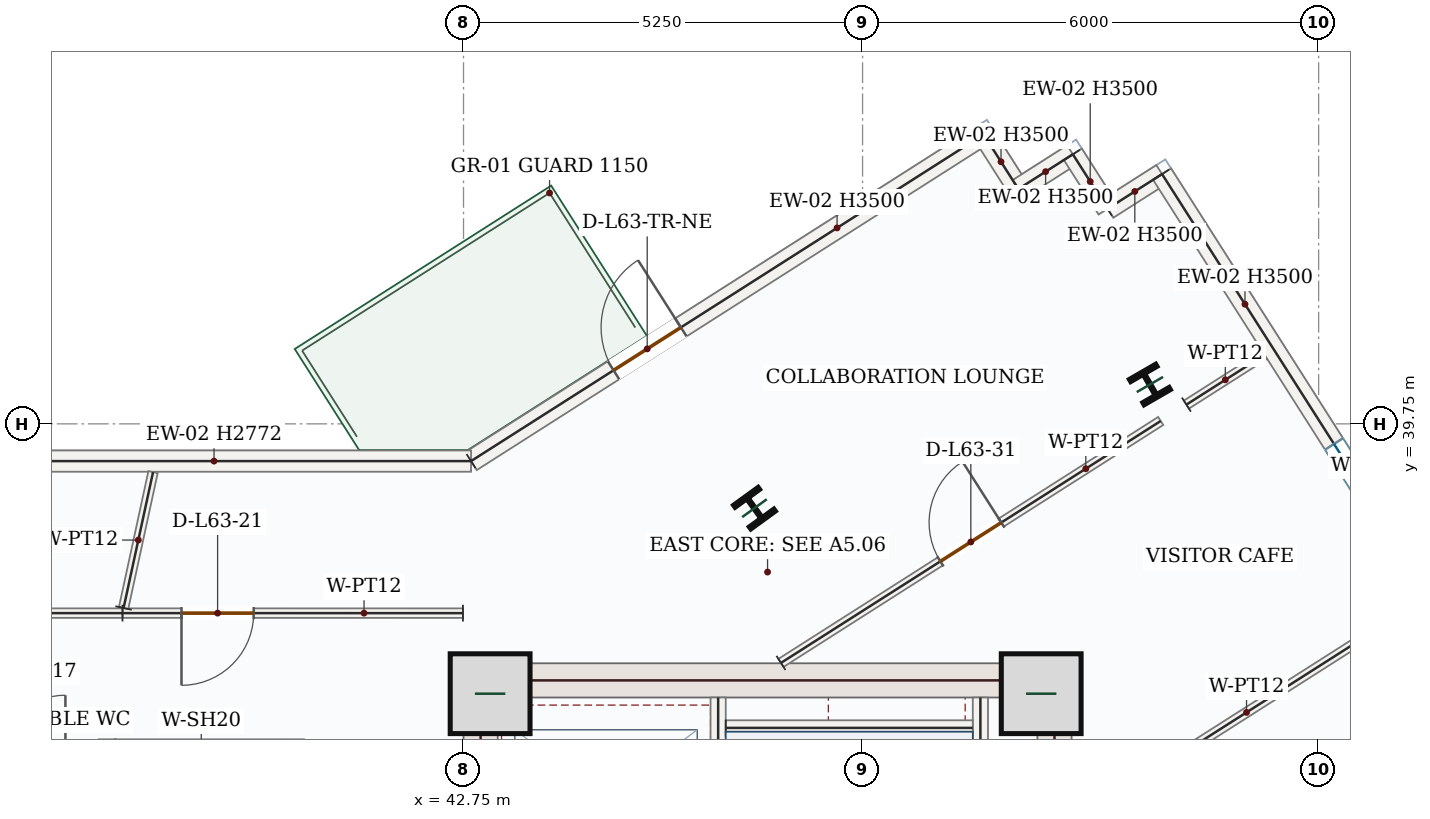
"""IFC4 building model, lengths in metres.
Left out: names, types, materials, properties, quantities, classifications, styles, units other than length and angle.
Written with IfcOpenShell. Run it as: python <this file> out.ifc"""

import sys

from ifc_helpers import new_model, si_unit, direction, frame, frame_2d, origin, origin_2d, place, context, subcontext, project, spatial, rectangle, i_section, extrude, source, transform, mapped, element, fill, save


model = new_model("IFC4")
c1 = context("Model", 3, precision=1e-05, world=origin(), true_north=direction((0.0, 1.0)))
c2 = subcontext(c1, "Body", "Model", "MODEL_VIEW")
j1 = project(units=[si_unit("LENGTHUNIT", "METRE"), si_unit("PLANEANGLEUNIT", "RADIAN")], contexts=[c1])
p1 = place(None, origin())
s1 = spatial("IfcSite", under=j1, at=p1, CompositionType="ELEMENT")
p2 = place(p1, origin())
s2 = spatial("IfcBuilding", under=s1, at=p2, CompositionType="ELEMENT")
p3 = place(p2, frame((0.0, 0.0, 265.35)))
s3 = spatial("IfcBuildingStorey", under=s2, at=p3, CompositionType="ELEMENT", Elevation=265.35)
p4 = place(p3, frame((42.975, 28.05, 0.0), z_axis=(0.0, 0.0, 1.0), x_axis=(0.0, 1.0, 0.0)))
e1 = element("IfcWall", 1, at=p4, inside=s3, PredefinedType="SHEAR", context=c2, shape_type="SweptSolid", body=[
    extrude(rectangle(XDim=8.55, YDim=0.45, at=frame_2d((4.275, 0.0))), origin(), (0.0, 0.0, 1.0), 3.5),
])
p5 = place(p4, frame((1.5, 0.0, 0.0)))
e2 = element("IfcOpeningElement", 2, at=p5, cuts=e1, PredefinedType="OPENING", context=c2, shape_type="SweptSolid", body=[
    extrude(rectangle(XDim=1.1, YDim=2.2, at=frame_2d((0.55, 1.1))), frame((0.0, 0.235, 0.0), z_axis=(0.0, -1.0, 0.0), x_axis=(1.0, 0.0, 0.0)), (0.0, 0.0, 1.0), 0.47),
])
m1 = source(origin(), c2, "Body", "SweptSolid", [
    extrude(rectangle(XDim=8.55, YDim=0.45, at=frame_2d((4.275, 0.0))), origin(), (0.0, 0.0, 1.0), 3.5),
])
p6 = place(p3, frame((50.525, 28.05, 0.0), z_axis=(0.0, 0.0, 1.0), x_axis=(0.0, 1.0, 0.0)))
e3 = element("IfcWall", 3, at=p6, inside=s3, PredefinedType="SHEAR", context=c2, shape_type="MappedRepresentation", body=[
    mapped(m1, transform((0.0, 0.0, 0.0), x_axis=(1.0, 0.0, 0.0), y_axis=(0.0, 1.0, 0.0), z_axis=(0.0, 0.0, 1.0), scale=1.0)),
])
m2 = source(origin(), c2, "Body", "SweptSolid", [
    extrude(rectangle(XDim=7.1, YDim=0.45, at=frame_2d((3.55, 0.0))), origin(), (0.0, 0.0, 1.0), 3.5),
])
p7 = place(p3, frame((43.2, 36.375, 0.0), z_axis=(0.0, 0.0, 1.0), x_axis=(1.0, 0.0, 0.0)))
e4 = element("IfcWall", 4, at=p7, inside=s3, PredefinedType="SHEAR", context=c2, shape_type="MappedRepresentation", body=[
    mapped(m2, transform((0.0, 0.0, 0.0), x_axis=(1.0, 0.0, 0.0), y_axis=(0.0, 1.0, 0.0), z_axis=(0.0, 0.0, 1.0), scale=1.0)),
])
m3 = source(origin(), c2, "Body", "SweptSolid", [
    extrude(rectangle(XDim=1.05, YDim=1.05, at=origin_2d()), origin(), (0.0, 0.0, 1.0), 3.75),
])
for number, where, z_axis, x_axis in (
    (5, (43.1, 36.2, 0.0), (0.0, 0.0, 1.0), (1.0, 0.0, 0.0)),
    (6, (50.35, 36.2, 0.0), (0.0, 0.0, 1.0), (1.0, 0.0, 0.0)),
):
    element("IfcColumn", number, at=place(p3, frame(where, z_axis=z_axis, x_axis=x_axis)), inside=s3, PredefinedType="COLUMN", context=c2, shape_type="MappedRepresentation", body=[
        mapped(m3, transform((0.0, 0.0, 0.0), x_axis=(1.0, 0.0, 0.0), y_axis=(0.0, 1.0, 0.0), z_axis=(0.0, 0.0, 1.0), scale=1.0)),
    ])
m4 = source(origin(), c2, "Body", "SweptSolid", [
    extrude(i_section(OverallWidth=0.399, OverallDepth=0.386, WebThickness=0.021, FlangeThickness=0.033, FilletRadius=0.018, at=origin_2d()), origin(), (0.0, 0.0, 1.0), 3.75),
])
for number, where, z_axis, x_axis in (
    (7, (46.578, 38.641, 0.0), (0.0, 0.0, 1.0), (0.809, 0.588, 0.0)),
    (8, (51.78, 40.268, 0.0), (0.0, 0.0, 1.0), (0.866, 0.5, 0.0)),
):
    element("IfcColumn", number, at=place(p3, frame(where, z_axis=z_axis, x_axis=x_axis)), inside=s3, PredefinedType="COLUMN", context=c2, shape_type="MappedRepresentation", body=[
        mapped(m4, transform((0.0, 0.0, 0.0), x_axis=(1.0, 0.0, 0.0), y_axis=(0.0, 1.0, 0.0), z_axis=(0.0, 0.0, 1.0), scale=1.0)),
    ])
p8 = place(p3, frame((42.849, 39.26, 0.0), z_axis=(0.0, 0.0, 1.0), x_axis=(0.843388565396, 0.537304129669, 0.0)))
e9 = element("IfcWall", 9, at=p8, inside=s3, PredefinedType="SOLIDWALL", context=c2, shape_type="SweptSolid", body=[
    extrude(rectangle(XDim=7.996, YDim=0.28, at=frame_2d((3.998, 0.0))), origin(), (0.0, 0.0, 1.0), 3.5),
])
p9 = place(p8, frame((2.223, 0.0, 0.0)))
e10 = element("IfcOpeningElement", 10, at=p9, cuts=e9, PredefinedType="OPENING", context=c2, shape_type="SweptSolid", body=[
    extrude(rectangle(XDim=1.05, YDim=2.15, at=frame_2d((0.525, 1.075))), frame((0.0, 0.15, 0.0), z_axis=(0.0, -1.0, 0.0), x_axis=(1.0, 0.0, 0.0)), (0.0, 0.0, 1.0), 0.3),
])
m5 = source(origin(), c2, "Body", "SweptSolid", [
    extrude(rectangle(XDim=0.85, YDim=0.28, at=frame_2d((0.425, 0.0))), origin(), (0.0, 0.0, 1.0), 3.5),
])
for number, where, z_axis, x_axis in (
    (11, (49.593, 43.556, 0.0), (0.0, 0.0, 1.0), (0.537, -0.843, 0.0)),
    (12, (50.05, 42.84, 0.0), (0.0, 0.0, 1.0), (0.843, 0.537, 0.0)),
    (13, (50.767, 43.296, 0.0), (0.0, 0.0, 1.0), (0.537, -0.843, 0.0)),
    (14, (51.223, 42.579, 0.0), (0.0, 0.0, 1.0), (0.843, 0.537, 0.0)),
):
    element("IfcWall", number, at=place(p3, frame(where, z_axis=z_axis, x_axis=x_axis)), inside=s3, PredefinedType="SOLIDWALL", context=c2, shape_type="MappedRepresentation", body=[
        mapped(m5, transform((0.0, 0.0, 0.0), x_axis=(1.0, 0.0, 0.0), y_axis=(0.0, 1.0, 0.0), z_axis=(0.0, 0.0, 1.0), scale=1.0)),
    ])
p10 = place(p3, frame((51.94, 43.036, 0.0), z_axis=(0.0, 0.0, 1.0), x_axis=(0.537314949054, -0.843381672508, 0.0)))
e15 = element("IfcWall", 15, at=p10, inside=s3, PredefinedType="SOLIDWALL", context=c2, shape_type="SweptSolid", body=[
    extrude(rectangle(XDim=9.92, YDim=0.28, at=frame_2d((4.96, 0.0))), origin(), (0.0, 0.0, 1.0), 3.5),
])
p11 = place(p10, frame((4.21, 0.0, 0.85)))
e16 = element("IfcOpeningElement", 16, at=p11, cuts=e15, PredefinedType="OPENING", context=c2, shape_type="SweptSolid", body=[
    extrude(rectangle(XDim=1.5, YDim=1.5, at=frame_2d((0.75, 0.75))), frame((0.0, 0.15, 0.0), z_axis=(0.0, -1.0, 0.0), x_axis=(1.0, 0.0, 0.0)), (0.0, 0.0, 1.0), 0.3),
])
m6 = source(origin(), c2, "Body", "SweptSolid", [
    extrude(rectangle(XDim=6.763, YDim=0.28, at=frame_2d((3.381, 0.0))), origin(), (0.0, 0.0, 1.0), 2.772),
])
p12 = place(p3, frame((36.086, 39.26, 0.0), z_axis=(0.0, 0.0, 1.0), x_axis=(1.0, 0.0, 0.0)))
e17 = element("IfcWall", 17, at=p12, inside=s3, PredefinedType="SOLIDWALL", context=c2, shape_type="MappedRepresentation", body=[
    mapped(m6, transform((0.0, 0.0, 0.0), x_axis=(1.0, 0.0, 0.0), y_axis=(0.0, 1.0, 0.0), z_axis=(0.0, 0.0, 1.0), scale=1.0)),
])
m7 = source(origin(), c2, "Body", "SweptSolid", [
    extrude(rectangle(XDim=7.87, YDim=0.2, at=frame_2d((3.935, 0.0))), origin(), (0.0, 0.0, 1.0), 3.5),
])
p13 = place(p3, frame((49.55, 28.28, 0.0), z_axis=(0.0, 0.0, 1.0), x_axis=(0.0, 1.0, 0.0)))
e18 = element("IfcWall", 18, at=p13, inside=s3, PredefinedType="SOLIDWALL", context=c2, shape_type="MappedRepresentation", body=[
    mapped(m7, transform((0.0, 0.0, 0.0), x_axis=(1.0, 0.0, 0.0), y_axis=(0.0, 1.0, 0.0), z_axis=(0.0, 0.0, 1.0), scale=1.0)),
])
p14 = place(p3, frame((46.1, 28.15, 0.0), z_axis=(0.0, 0.0, 1.0), x_axis=(0.0, 1.0, 0.0)))
e19 = element("IfcWall", 19, at=p14, inside=s3, PredefinedType="SOLIDWALL", context=c2, shape_type="SweptSolid", body=[
    extrude(rectangle(XDim=8.0, YDim=0.2, at=frame_2d((4.0, 0.0))), origin(), (0.0, 0.0, 1.0), 3.5),
])
p15 = place(p14, frame((0.4, 0.0, 0.0)))
e20 = element("IfcOpeningElement", 20, at=p15, cuts=e19, PredefinedType="OPENING", context=c2, shape_type="SweptSolid", body=[
    extrude(rectangle(XDim=1.05, YDim=2.15, at=frame_2d((0.525, 1.075))), frame((0.0, 0.11, 0.0), z_axis=(0.0, -1.0, 0.0), x_axis=(1.0, 0.0, 0.0)), (0.0, 0.0, 1.0), 0.22),
])
m8 = source(origin(), c2, "Body", "SweptSolid", [
    extrude(rectangle(XDim=3.25, YDim=0.2, at=frame_2d((1.625, 0.0))), origin(), (0.0, 0.0, 1.0), 3.5),
])
p16 = place(p3, frame((46.2, 35.75, 0.0), z_axis=(0.0, 0.0, 1.0), x_axis=(1.0, 0.0, 0.0)))
e21 = element("IfcWall", 21, at=p16, inside=s3, PredefinedType="SOLIDWALL", context=c2, shape_type="MappedRepresentation", body=[
    mapped(m8, transform((0.0, 0.0, 0.0), x_axis=(1.0, 0.0, 0.0), y_axis=(0.0, 1.0, 0.0), z_axis=(0.0, 0.0, 1.0), scale=1.0)),
])
m9 = source(origin(), c2, "Body", "SweptSolid", [
    extrude(rectangle(XDim=2.4, YDim=0.2, at=frame_2d((1.2, 0.0))), origin(), (0.0, 0.0, 1.0), 3.5),
])
p17 = place(p3, frame((38.05, 33.2, 0.0), z_axis=(0.0, 0.0, 1.0), x_axis=(0.0, 1.0, 0.0)))
e22 = element("IfcWall", 22, at=p17, inside=s3, PredefinedType="SOLIDWALL", context=c2, shape_type="MappedRepresentation", body=[
    mapped(m9, transform((0.0, 0.0, 0.0), x_axis=(1.0, 0.0, 0.0), y_axis=(0.0, 1.0, 0.0), z_axis=(0.0, 0.0, 1.0), scale=1.0)),
])
p18 = place(p3, frame((40.55, 33.2, 0.0), z_axis=(0.0, 0.0, 1.0), x_axis=(0.0, 1.0, 0.0)))
e23 = element("IfcWall", 23, at=p18, inside=s3, PredefinedType="SOLIDWALL", context=c2, shape_type="SweptSolid", body=[
    extrude(rectangle(XDim=2.4, YDim=0.2, at=frame_2d((1.2, 0.0))), origin(), (0.0, 0.0, 1.0), 3.5),
])
p19 = place(p18, frame((0.65, 0.0, 0.0)))
e24 = element("IfcOpeningElement", 24, at=p19, cuts=e23, PredefinedType="OPENING", context=c2, shape_type="SweptSolid", body=[
    extrude(rectangle(XDim=1.1, YDim=2.15, at=frame_2d((0.55, 1.075))), frame((0.0, 0.11, 0.0), z_axis=(0.0, -1.0, 0.0), x_axis=(1.0, 0.0, 0.0)), (0.0, 0.0, 1.0), 0.22),
])
p20 = place(p3, frame((46.927, 36.605, 0.0), z_axis=(0.0, 0.0, 1.0), x_axis=(0.843398332862, 0.537288797693, 0.0)))
e25 = element("IfcWall", 25, at=p20, inside=s3, PredefinedType="PARTITIONING", context=c2, shape_type="SweptSolid", body=[
    extrude(rectangle(XDim=5.924, YDim=0.125, at=frame_2d((2.962, 0.0))), origin(), (0.0, 0.0, 1.0), 3.5),
])
p21 = place(p20, frame((2.487, 0.0, 0.0)))
e26 = element("IfcOpeningElement", 26, at=p21, cuts=e25, PredefinedType="OPENING", context=c2, shape_type="SweptSolid", body=[
    extrude(rectangle(XDim=0.95, YDim=2.15, at=frame_2d((0.475, 1.075))), frame((0.0, 0.073, 0.0), z_axis=(0.0, -1.0, 0.0), x_axis=(1.0, 0.0, 0.0)), (0.0, 0.0, 1.0), 0.145),
])
m10 = source(origin(), c2, "Body", "SweptSolid", [
    extrude(rectangle(XDim=1.215, YDim=0.125, at=frame_2d((0.607, 0.0))), origin(), (0.0, 0.0, 1.0), 3.5),
])
p22 = place(p3, frame((52.26, 40.003, 0.0), z_axis=(0.0, 0.0, 1.0), x_axis=(0.84340481812, 0.537278617453, 0.0)))
e27 = element("IfcWall", 27, at=p22, inside=s3, PredefinedType="PARTITIONING", context=c2, shape_type="MappedRepresentation", body=[
    mapped(m10, transform((0.0, 0.0, 0.0), x_axis=(1.0, 0.0, 0.0), y_axis=(0.0, 1.0, 0.0), z_axis=(0.0, 0.0, 1.0), scale=1.0)),
])
m11 = source(origin(), c2, "Body", "SweptSolid", [
    extrude(rectangle(XDim=5.446, YDim=0.125, at=frame_2d((2.723, 0.0))), origin(), (0.0, 0.0, 1.0), 3.5),
])
p23 = place(p3, frame((55.348, 37.417, 0.0), z_axis=(0.0, 0.0, 1.0), x_axis=(-0.843395566027, -0.537293140851, 0.0)))
e28 = element("IfcWall", 28, at=p23, inside=s3, PredefinedType="PARTITIONING", context=c2, shape_type="MappedRepresentation", body=[
    mapped(m11, transform((0.0, 0.0, 0.0), x_axis=(1.0, 0.0, 0.0), y_axis=(0.0, 1.0, 0.0), z_axis=(0.0, 0.0, 1.0), scale=1.0)),
])
p24 = place(p3, frame((42.742, 37.26, 0.0), z_axis=(0.0, 0.0, 1.0), x_axis=(-0.999999998515, 5.4504824e-05, 0.0)))
e29 = element("IfcWall", 29, at=p24, inside=s3, PredefinedType="PARTITIONING", context=c2, shape_type="SweptSolid", body=[
    extrude(rectangle(XDim=4.479, YDim=0.125, at=frame_2d((2.24, 0.0))), origin(), (0.0, 0.0, 1.0), 3.5),
])
p25 = place(p24, frame((2.753, 0.0, 0.0)))
e30 = element("IfcOpeningElement", 30, at=p25, cuts=e29, PredefinedType="OPENING", context=c2, shape_type="SweptSolid", body=[
    extrude(rectangle(XDim=0.95, YDim=2.15, at=frame_2d((0.475, 1.075))), frame((0.0, 0.073, 0.0), z_axis=(0.0, -1.0, 0.0), x_axis=(1.0, 0.0, 0.0)), (0.0, 0.0, 1.0), 0.145),
])
m12 = source(origin(), c2, "Body", "SweptSolid", [
    extrude(rectangle(XDim=1.829, YDim=0.125, at=frame_2d((0.915, 0.0))), origin(), (0.0, 0.0, 1.0), 3.5),
])
p26 = place(p3, frame((38.278, 37.327, 0.0), z_axis=(0.0, 0.0, 1.0), x_axis=(0.21182559105, 0.977307484355, 0.0)))
e31 = element("IfcWall", 31, at=p26, inside=s3, PredefinedType="PARTITIONING", context=c2, shape_type="MappedRepresentation", body=[
    mapped(m12, transform((0.0, 0.0, 0.0), x_axis=(1.0, 0.0, 0.0), y_axis=(0.0, 1.0, 0.0), z_axis=(0.0, 0.0, 1.0), scale=1.0)),
])
p27 = place(p3, frame((38.263, 37.26, 0.0), z_axis=(0.0, 0.0, 1.0), x_axis=(-1.0, 0.0, 0.0)))
e32 = element("IfcWall", 32, at=p27, inside=s3, PredefinedType="PARTITIONING", context=c2, shape_type="SweptSolid", body=[
    extrude(rectangle(XDim=6.867, YDim=0.125, at=frame_2d((3.434, 0.0))), origin(), (0.0, 0.0, 1.0), 3.5),
])
p28 = place(p27, frame((2.071, 0.0, 0.0)))
e33 = element("IfcOpeningElement", 33, at=p28, cuts=e32, PredefinedType="OPENING", context=c2, shape_type="SweptSolid", body=[
    extrude(rectangle(XDim=0.95, YDim=2.15, at=frame_2d((0.475, 1.075))), frame((0.0, 0.073, 0.0), z_axis=(0.0, -1.0, 0.0), x_axis=(1.0, 0.0, 0.0)), (0.0, 0.0, 1.0), 0.145),
])
m13 = source(origin(), c2, "Body", "SweptSolid", [
    extrude(rectangle(XDim=1.05, YDim=2.15, at=frame_2d((0.525, 1.075))), frame((0.0, 0.025, 0.0), z_axis=(0.0, -1.0, 0.0), x_axis=(1.0, 0.0, 0.0)), (0.0, 0.0, 1.0), 0.05),
])
p29 = place(p9, origin())
e34 = element("IfcDoor", 34, at=p29, inside=s3, OperationType="SINGLE_SWING_RIGHT", PredefinedType="DOOR", context=c2, shape_type="MappedRepresentation", body=[
    mapped(m13, transform((0.0, 0.0, 0.0), x_axis=(1.0, 0.0, 0.0), y_axis=(0.0, 1.0, 0.0), z_axis=(0.0, 0.0, 1.0), scale=1.0)),
])
fill(e10, e34)
m14 = source(origin(), c2, "Body", "SweptSolid", [
    extrude(rectangle(XDim=1.5, YDim=1.5, at=frame_2d((0.75, 0.75))), frame((0.0, 0.03, 0.0), z_axis=(0.0, -1.0, 0.0), x_axis=(1.0, 0.0, 0.0)), (0.0, 0.0, 1.0), 0.06),
])
p30 = place(p11, origin())
e35 = element("IfcWindow", 35, at=p30, inside=s3, PartitioningType="SINGLE_PANEL", PredefinedType="WINDOW", context=c2, shape_type="MappedRepresentation", body=[
    mapped(m14, transform((0.0, 0.0, 0.0), x_axis=(1.0, 0.0, 0.0), y_axis=(0.0, 1.0, 0.0), z_axis=(0.0, 0.0, 1.0), scale=1.0)),
])
fill(e16, e35)
m15 = source(origin(), c2, "Body", "SweptSolid", [
    extrude(rectangle(XDim=0.95, YDim=2.15, at=frame_2d((0.475, 1.075))), frame((0.0, 0.025, 0.0), z_axis=(0.0, -1.0, 0.0), x_axis=(1.0, 0.0, 0.0)), (0.0, 0.0, 1.0), 0.05),
])
p31 = place(p25, origin())
e36 = element("IfcDoor", 36, at=p31, inside=s3, OperationType="SINGLE_SWING_RIGHT", PredefinedType="DOOR", context=c2, shape_type="MappedRepresentation", body=[
    mapped(m15, transform((0.0, 0.0, 0.0), x_axis=(1.0, 0.0, 0.0), y_axis=(0.0, 1.0, 0.0), z_axis=(0.0, 0.0, 1.0), scale=1.0)),
])
fill(e30, e36)
p32 = place(p21, origin())
e37 = element("IfcDoor", 37, at=p32, inside=s3, OperationType="SINGLE_SWING_RIGHT", PredefinedType="DOOR", context=c2, shape_type="MappedRepresentation", body=[
    mapped(m15, transform((0.0, 0.0, 0.0), x_axis=(1.0, 0.0, 0.0), y_axis=(0.0, 1.0, 0.0), z_axis=(0.0, 0.0, 1.0), scale=1.0)),
])
fill(e26, e37)
save(model, sys.argv[1])
